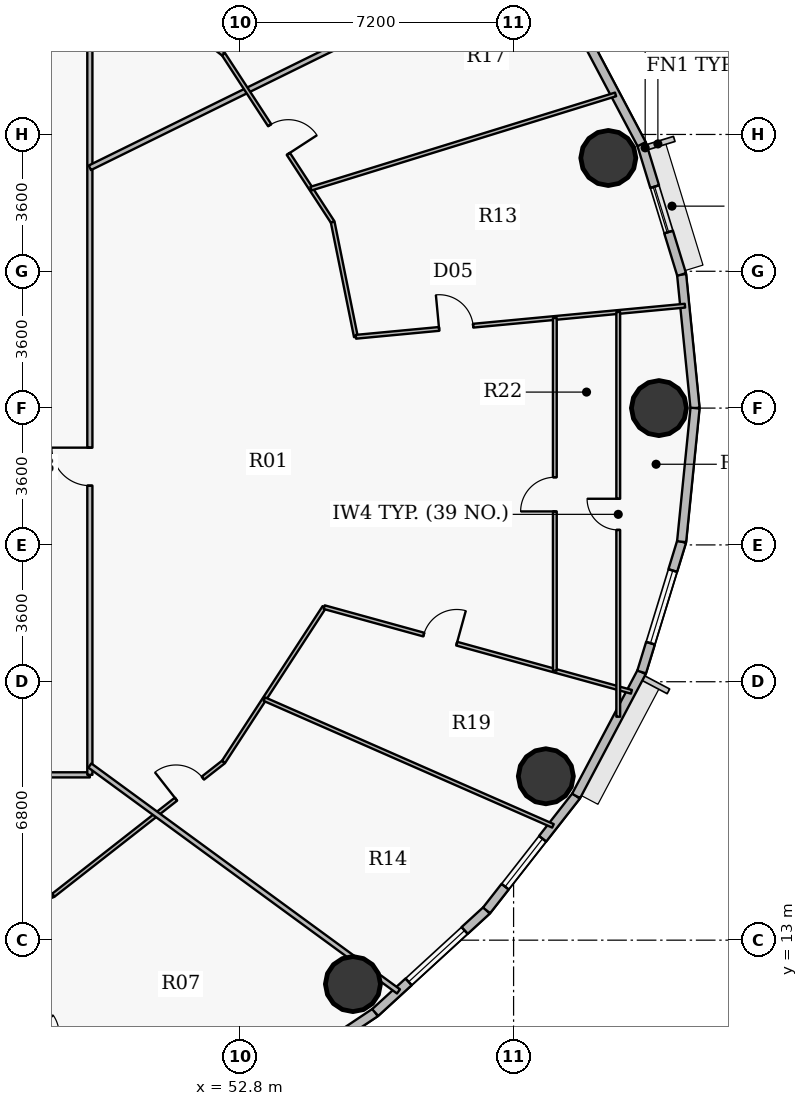
"""IFC4 building model, lengths in metres.
Left out: names, types, materials, properties, quantities, classifications, styles, units other than length and angle.
Written with IfcOpenShell. Run it as: python <this file> out.ifc"""

import sys

from ifc_helpers import new_model, si_unit, direction, frame, frame_2d, origin, origin_2d, place, context, subcontext, project, spatial, rectangle, hollow_circle, extrude, source, transform, mapped, element, fill, save


model = new_model("IFC4")
c1 = context("Model", 3, precision=1e-05, world=origin(), true_north=direction((0.0, 1.0)))
c2 = subcontext(c1, "Body", "Model", "MODEL_VIEW")
j1 = project(units=[si_unit("LENGTHUNIT", "METRE"), si_unit("PLANEANGLEUNIT", "RADIAN")], contexts=[c1])
p1 = place(None, origin())
s1 = spatial("IfcSite", under=j1, at=p1, CompositionType="ELEMENT")
p2 = place(p1, origin())
s2 = spatial("IfcBuilding", under=s1, at=p2, CompositionType="ELEMENT")
p3 = place(p2, frame((0.0, 0.0, 138.45)))
s3 = spatial("IfcBuildingStorey", under=s2, at=p3, CompositionType="ELEMENT", Elevation=138.45)
for number, where, z_axis, x_axis in (
    (1, (63.825, 27.0, 0.0), (0.0, 0.0, 1.0), (1.0, 0.0, 0.0)),
    (2, (62.493, 33.581, 0.0), (0.0, 0.0, 1.0), (1.0, 0.0, 0.0)),
    (3, (55.773, 11.844, 0.0), (0.0, 0.0, 1.0), (1.0, 0.0, 0.0)),
    (4, (60.849, 17.312, 0.0), (0.0, 0.0, 1.0), (1.0, 0.0, 0.0)),
):
    element("IfcColumn", number, at=place(p3, frame(where, z_axis=z_axis, x_axis=x_axis)), inside=s3, PredefinedType="COLUMN", context=c2, shape_type="SweptSolid", body=[
        extrude(hollow_circle(Radius=0.725, WallThickness=0.042, at=origin_2d()), origin(), (0.0, 0.0, 1.0), 3.75),
    ])
p4 = place(p3, frame((64.422, 30.515, 0.0), z_axis=(0.0, 0.0, 1.0), x_axis=(0.099989468229, -0.994988495533, 0.0)))
e5 = element("IfcWall", 5, at=p4, inside=s3, PredefinedType="SOLIDWALL", context=c2, shape_type="SweptSolid", body=[
    extrude(rectangle(XDim=3.533, YDim=0.24, at=frame_2d((1.767, 0.0))), origin(), (0.0, 0.0, 1.0), 3.5),
])
p5 = place(p3, frame((63.37, 33.945, 0.0), z_axis=(0.0, 0.0, 1.0), x_axis=(0.293124431344, -0.956074300329, 0.0)))
e6 = element("IfcWall", 6, at=p5, inside=s3, PredefinedType="SOLIDWALL", context=c2, shape_type="SweptSolid", body=[
    extrude(rectangle(XDim=3.587, YDim=0.24, at=frame_2d((1.793, 0.0))), origin(), (0.0, 0.0, 1.0), 3.5),
])
p6 = place(p5, frame((1.169, 0.0, 0.9)))
e7 = element("IfcOpeningElement", 7, at=p6, cuts=e6, PredefinedType="OPENING", context=c2, shape_type="SweptSolid", body=[
    extrude(rectangle(XDim=1.25, YDim=1.65, at=origin_2d()), frame((0.625, 0.13, 0.825), z_axis=(0.0, -1.0, 0.0), x_axis=(1.0, 0.0, 0.0)), (0.0, 0.0, 1.0), 0.26),
])
p7 = place(p3, frame((61.645, 37.206, 0.0), z_axis=(0.0, 0.0, 1.0), x_axis=(0.467614004126, -0.883932770716, 0.0)))
e8 = element("IfcWall", 8, at=p7, inside=s3, PredefinedType="SOLIDWALL", context=c2, shape_type="SweptSolid", body=[
    extrude(rectangle(XDim=3.689, YDim=0.24, at=frame_2d((1.844, 0.0))), origin(), (0.0, 0.0, 1.0), 3.5),
])
p8 = place(p3, frame((56.358, 11.097, 0.0), z_axis=(0.0, 0.0, 1.0), x_axis=(-0.831221811447, -0.555940914284, 0.0)))
e9 = element("IfcWall", 9, at=p8, inside=s3, PredefinedType="SOLIDWALL", context=c2, shape_type="SweptSolid", body=[
    extrude(rectangle(XDim=4.13, YDim=0.24, at=frame_2d((2.065, 0.0))), origin(), (0.0, 0.0, 1.0), 3.5),
])
p9 = place(p8, frame((1.065, 0.0, 0.9)))
e10 = element("IfcOpeningElement", 10, at=p9, cuts=e9, PredefinedType="OPENING", context=c2, shape_type="SweptSolid", body=[
    extrude(rectangle(XDim=2.0, YDim=1.75, at=origin_2d()), frame((1.0, 0.13, 0.875), z_axis=(0.0, -1.0, 0.0), x_axis=(1.0, 0.0, 0.0)), (0.0, 0.0, 1.0), 0.26),
])
p10 = place(p3, frame((59.289, 13.783, 0.0), z_axis=(0.0, 0.0, 1.0), x_axis=(-0.737113356241, -0.675769117414, 0.0)))
e11 = element("IfcWall", 11, at=p10, inside=s3, PredefinedType="SOLIDWALL", context=c2, shape_type="SweptSolid", body=[
    extrude(rectangle(XDim=3.976, YDim=0.24, at=frame_2d((1.988, 0.0))), origin(), (0.0, 0.0, 1.0), 3.5),
])
p11 = place(p10, frame((0.783, 0.0, 0.9)))
e12 = element("IfcOpeningElement", 12, at=p11, cuts=e11, PredefinedType="OPENING", context=c2, shape_type="SweptSolid", body=[
    extrude(rectangle(XDim=2.0, YDim=1.75, at=origin_2d()), frame((1.0, 0.13, 0.875), z_axis=(0.0, -1.0, 0.0), x_axis=(1.0, 0.0, 0.0)), (0.0, 0.0, 1.0), 0.26),
])
p12 = place(p3, frame((61.645, 16.794, 0.0), z_axis=(0.0, 0.0, 1.0), x_axis=(-0.616272103517, -0.787533297345, 0.0)))
e13 = element("IfcWall", 13, at=p12, inside=s3, PredefinedType="SOLIDWALL", context=c2, shape_type="SweptSolid", body=[
    extrude(rectangle(XDim=3.823, YDim=0.24, at=frame_2d((1.912, 0.0))), origin(), (0.0, 0.0, 1.0), 3.5),
])
p13 = place(p12, frame((1.43, 0.0, 0.9)))
e14 = element("IfcOpeningElement", 14, at=p13, cuts=e13, PredefinedType="OPENING", context=c2, shape_type="SweptSolid", body=[
    extrude(rectangle(XDim=1.6, YDim=1.75, at=origin_2d()), frame((0.8, 0.13, 0.875), z_axis=(0.0, -1.0, 0.0), x_axis=(1.0, 0.0, 0.0)), (0.0, 0.0, 1.0), 0.26),
])
p14 = place(p3, frame((63.37, 20.055, 0.0), z_axis=(0.0, 0.0, 1.0), x_axis=(-0.467614004126, -0.883932770716, 0.0)))
e15 = element("IfcWall", 15, at=p14, inside=s3, PredefinedType="SOLIDWALL", context=c2, shape_type="SweptSolid", body=[
    extrude(rectangle(XDim=3.689, YDim=0.24, at=frame_2d((1.844, 0.0))), origin(), (0.0, 0.0, 1.0), 3.5),
])
p15 = place(p3, frame((64.422, 23.485, 0.0), z_axis=(0.0, 0.0, 1.0), x_axis=(-0.293124431344, -0.956074300329, 0.0)))
e16 = element("IfcWall", 16, at=p15, inside=s3, PredefinedType="SOLIDWALL", context=c2, shape_type="SweptSolid", body=[
    extrude(rectangle(XDim=3.587, YDim=0.24, at=frame_2d((1.793, 0.0))), origin(), (0.0, 0.0, 1.0), 3.5),
])
p16 = place(p15, frame((0.794, 0.0, 0.9)))
e17 = element("IfcOpeningElement", 17, at=p16, cuts=e16, PredefinedType="OPENING", context=c2, shape_type="SweptSolid", body=[
    extrude(rectangle(XDim=2.0, YDim=1.75, at=origin_2d()), frame((1.0, 0.13, 0.875), z_axis=(0.0, -1.0, 0.0), x_axis=(1.0, 0.0, 0.0)), (0.0, 0.0, 1.0), 0.26),
])
p17 = place(p3, frame((64.775, 27.0, 0.0), z_axis=(0.0, 0.0, 1.0), x_axis=(-0.099989468229, -0.994988495533, 0.0)))
e18 = element("IfcWall", 18, at=p17, inside=s3, PredefinedType="SOLIDWALL", context=c2, shape_type="SweptSolid", body=[
    extrude(rectangle(XDim=3.533, YDim=0.24, at=frame_2d((1.767, 0.0))), origin(), (0.0, 0.0, 1.0), 3.5),
])
p18 = place(p3, frame((38.477, 17.35, 0.0), z_axis=(0.0, 0.0, 1.0), x_axis=(1.0, 0.0, 0.0)))
e19 = element("IfcWall", 19, at=p18, inside=s3, PredefinedType="PARTITIONING", context=c2, shape_type="SweptSolid", body=[
    extrude(rectangle(XDim=10.373, YDim=0.135, at=frame_2d((5.187, 0.0))), origin(), (0.0, 0.0, 1.0), 2.935),
])
p19 = place(p18, frame((4.687, 0.0, 0.0)))
e20 = element("IfcOpeningElement", 20, at=p19, cuts=e19, PredefinedType="OPENING", context=c2, shape_type="SweptSolid", body=[
    extrude(rectangle(XDim=1.0, YDim=2.15, at=origin_2d()), frame((0.5, 0.078, 1.075), z_axis=(0.0, -1.0, 0.0), x_axis=(1.0, 0.0, 0.0)), (0.0, 0.0, 1.0), 0.155),
])
p20 = place(p3, frame((45.35, 13.17, 0.0), z_axis=(0.0, 0.0, 1.0), x_axis=(0.928802486491, 0.370575149044, 0.0)))
e21 = element("IfcWall", 21, at=p20, inside=s3, PredefinedType="PARTITIONING", context=c2, shape_type="SweptSolid", body=[
    extrude(rectangle(XDim=2.736, YDim=0.1, at=frame_2d((1.368, 0.0))), origin(), (0.0, 0.0, 1.0), 3.5),
])
p21 = place(p3, frame((45.35, 13.17, 0.0), z_axis=(0.0, 0.0, 1.0), x_axis=(0.560082631059, -0.828436748573, 0.0)))
e22 = element("IfcWall", 22, at=p21, inside=s3, PredefinedType="PARTITIONING", context=c2, shape_type="SweptSolid", body=[
    extrude(rectangle(XDim=7.301, YDim=0.1, at=frame_2d((3.65, 0.0))), origin(), (0.0, 0.0, 1.0), 2.935),
])
p22 = place(p21, frame((3.2, 0.0, 0.0)))
e23 = element("IfcOpeningElement", 23, at=p22, cuts=e22, PredefinedType="OPENING", context=c2, shape_type="SweptSolid", body=[
    extrude(rectangle(XDim=0.9, YDim=2.1, at=origin_2d()), frame((0.45, 0.06, 1.05), z_axis=(0.0, -1.0, 0.0), x_axis=(1.0, 0.0, 0.0)), (0.0, 0.0, 1.0), 0.12),
])
p23 = place(p3, frame((47.891, 14.184, 0.0), z_axis=(0.0, 0.0, 1.0), x_axis=(0.787333679705, 0.616527109544, 0.0)))
e24 = element("IfcWall", 24, at=p23, inside=s3, PredefinedType="PARTITIONING", context=c2, shape_type="SweptSolid", body=[
    extrude(rectangle(XDim=5.685, YDim=0.1, at=frame_2d((2.842, 0.0))), origin(), (0.0, 0.0, 1.0), 2.935),
])
p24 = place(p23, frame((4.096, 0.0, 0.0)))
e25 = element("IfcOpeningElement", 25, at=p24, cuts=e24, PredefinedType="OPENING", context=c2, shape_type="SweptSolid", body=[
    extrude(rectangle(XDim=0.9, YDim=2.1, at=origin_2d()), frame((0.45, 0.06, 1.05), z_axis=(0.0, -1.0, 0.0), x_axis=(1.0, 0.0, 0.0)), (0.0, 0.0, 1.0), 0.12),
])
p25 = place(p3, frame((47.891, 39.816, 0.0), z_axis=(0.0, 0.0, 1.0), x_axis=(0.787347250317, -0.61650977885, 0.0)))
e26 = element("IfcWall", 26, at=p25, inside=s3, PredefinedType="PARTITIONING", context=c2, shape_type="SweptSolid", body=[
    extrude(rectangle(XDim=5.683, YDim=0.1, at=frame_2d((2.842, 0.0))), origin(), (0.0, 0.0, 1.0), 2.935),
])
p26 = place(p25, frame((3.923, 0.0, 0.0)))
e27 = element("IfcOpeningElement", 27, at=p26, cuts=e26, PredefinedType="OPENING", context=c2, shape_type="SweptSolid", body=[
    extrude(rectangle(XDim=0.9, YDim=2.1, at=origin_2d()), frame((0.45, 0.06, 1.05), z_axis=(0.0, -1.0, 0.0), x_axis=(1.0, 0.0, 0.0)), (0.0, 0.0, 1.0), 0.12),
])
p27 = place(p25, frame((1.286, 0.0, 0.0)))
e28 = element("IfcOpeningElement", 28, at=p27, cuts=e26, PredefinedType="OPENING", context=c2, shape_type="SweptSolid", body=[
    extrude(rectangle(XDim=0.9, YDim=2.1, at=origin_2d()), frame((0.45, 0.06, 1.05), z_axis=(0.0, -1.0, 0.0), x_axis=(1.0, 0.0, 0.0)), (0.0, 0.0, 1.0), 0.12),
])
p28 = place(p3, frame((48.85, 17.35, 0.0), z_axis=(0.0, 0.0, 1.0), x_axis=(0.0, 1.0, 0.0)))
e29 = element("IfcWall", 29, at=p28, inside=s3, PredefinedType="PARTITIONING", context=c2, shape_type="SweptSolid", body=[
    extrude(rectangle(XDim=19.3, YDim=0.135, at=frame_2d((9.65, 0.0))), origin(), (0.0, 0.0, 1.0), 2.935),
])
p29 = place(p28, frame((7.609, 0.0, 0.0)))
e30 = element("IfcOpeningElement", 30, at=p29, cuts=e29, PredefinedType="OPENING", context=c2, shape_type="SweptSolid", body=[
    extrude(rectangle(XDim=1.0, YDim=2.15, at=origin_2d()), frame((0.5, 0.078, 1.075), z_axis=(0.0, -1.0, 0.0), x_axis=(1.0, 0.0, 0.0)), (0.0, 0.0, 1.0), 0.155),
])
p30 = place(p3, frame((48.85, 17.595, 0.0), z_axis=(0.0, 0.0, 1.0), x_axis=(0.806958414, -0.590608261096, 0.0)))
e31 = element("IfcWall", 31, at=p30, inside=s3, PredefinedType="PARTITIONING", context=c2, shape_type="SweptSolid", body=[
    extrude(rectangle(XDim=10.063, YDim=0.135, at=frame_2d((5.032, 0.0))), origin(), (0.0, 0.0, 1.0), 2.935),
])
p31 = place(p3, frame((48.85, 33.323, 0.0), z_axis=(0.0, 0.0, 1.0), x_axis=(0.897255437174, 0.44151181237, 0.0)))
e32 = element("IfcWall", 32, at=p31, inside=s3, PredefinedType="PARTITIONING", context=c2, shape_type="SweptSolid", body=[
    extrude(rectangle(XDim=12.746, YDim=0.135, at=frame_2d((6.373, 0.0))), origin(), (0.0, 0.0, 1.0), 2.935),
])
p32 = place(p3, frame((52.366, 17.689, 0.0), z_axis=(0.0, 0.0, 1.0), x_axis=(0.545413870093, 0.838166874978, 0.0)))
e33 = element("IfcWall", 33, at=p32, inside=s3, PredefinedType="PARTITIONING", context=c2, shape_type="SweptSolid", body=[
    extrude(rectangle(XDim=4.859, YDim=0.1, at=frame_2d((2.43, 0.0))), origin(), (0.0, 0.0, 1.0), 2.935),
])
p33 = place(p3, frame((52.366, 36.311, 0.0), z_axis=(0.0, 0.0, 1.0), x_axis=(0.545405249109, -0.838172484781, 0.0)))
e34 = element("IfcWall", 34, at=p33, inside=s3, PredefinedType="PARTITIONING", context=c2, shape_type="SweptSolid", body=[
    extrude(rectangle(XDim=5.269, YDim=0.1, at=frame_2d((2.634, 0.0))), origin(), (0.0, 0.0, 1.0), 2.935),
])
p34 = place(p33, frame((2.228, 0.0, 0.0)))
e35 = element("IfcOpeningElement", 35, at=p34, cuts=e34, PredefinedType="OPENING", context=c2, shape_type="SweptSolid", body=[
    extrude(rectangle(XDim=0.9, YDim=2.1, at=origin_2d()), frame((0.45, 0.06, 1.05), z_axis=(0.0, -1.0, 0.0), x_axis=(1.0, 0.0, 0.0)), (0.0, 0.0, 1.0), 0.12),
])
p35 = place(p3, frame((53.442, 19.342, 0.0), z_axis=(0.0, 0.0, 1.0), x_axis=(0.91563160904, -0.402018353469, 0.0)))
e36 = element("IfcWall", 36, at=p35, inside=s3, PredefinedType="PARTITIONING", context=c2, shape_type="SweptSolid", body=[
    extrude(rectangle(XDim=8.294, YDim=0.1, at=frame_2d((4.147, 0.0))), origin(), (0.0, 0.0, 1.0), 2.935),
])
p36 = place(p3, frame((54.668, 32.774, 0.0), z_axis=(0.0, 0.0, 1.0), x_axis=(0.955345753083, 0.295490257144, 0.0)))
e37 = element("IfcWall", 37, at=p36, inside=s3, PredefinedType="PARTITIONING", context=c2, shape_type="SweptSolid", body=[
    extrude(rectangle(XDim=8.39, YDim=0.1, at=frame_2d((4.195, 0.0))), origin(), (0.0, 0.0, 1.0), 2.935),
])
p37 = place(p3, frame((55.017, 21.762, 0.0), z_axis=(0.0, 0.0, 1.0), x_axis=(0.964092156587, -0.265567907714, 0.0)))
e38 = element("IfcWall", 38, at=p37, inside=s3, PredefinedType="PARTITIONING", context=c2, shape_type="SweptSolid", body=[
    extrude(rectangle(XDim=8.385, YDim=0.1, at=frame_2d((4.192, 0.0))), origin(), (0.0, 0.0, 1.0), 2.935),
])
p38 = place(p37, frame((2.717, 0.0, 0.0)))
e39 = element("IfcOpeningElement", 39, at=p38, cuts=e38, PredefinedType="OPENING", context=c2, shape_type="SweptSolid", body=[
    extrude(rectangle(XDim=0.9, YDim=2.1, at=origin_2d()), frame((0.45, 0.06, 1.05), z_axis=(0.0, -1.0, 0.0), x_axis=(1.0, 0.0, 0.0)), (0.0, 0.0, 1.0), 0.12),
])
p39 = place(p3, frame((55.24, 31.895, 0.0), z_axis=(0.0, 0.0, 1.0), x_axis=(0.198189059207, -0.980163811213, 0.0)))
e40 = element("IfcWall", 40, at=p39, inside=s3, PredefinedType="PARTITIONING", context=c2, shape_type="SweptSolid", body=[
    extrude(rectangle(XDim=3.08, YDim=0.1, at=frame_2d((1.54, 0.0))), origin(), (0.0, 0.0, 1.0), 2.935),
])
p40 = place(p3, frame((55.85, 28.876, 0.0), z_axis=(0.0, 0.0, 1.0), x_axis=(0.995563342767, 0.094093732729, 0.0)))
e41 = element("IfcWall", 41, at=p40, inside=s3, PredefinedType="PARTITIONING", context=c2, shape_type="SweptSolid", body=[
    extrude(rectangle(XDim=8.697, YDim=0.1, at=frame_2d((4.349, 0.0))), origin(), (0.0, 0.0, 1.0), 2.935),
])
p41 = place(p40, frame((2.199, 0.0, 0.0)))
e42 = element("IfcOpeningElement", 42, at=p41, cuts=e41, PredefinedType="OPENING", context=c2, shape_type="SweptSolid", body=[
    extrude(rectangle(XDim=0.9, YDim=2.1, at=origin_2d()), frame((0.45, 0.06, 1.05), z_axis=(0.0, -1.0, 0.0), x_axis=(1.0, 0.0, 0.0)), (0.0, 0.0, 1.0), 0.12),
])
p42 = place(p3, frame((61.085, 20.09, 0.0), z_axis=(0.0, 0.0, 1.0), x_axis=(0.0, 1.0, 0.0)))
e43 = element("IfcWall", 43, at=p42, inside=s3, PredefinedType="PARTITIONING", context=c2, shape_type="SweptSolid", body=[
    extrude(rectangle(XDim=9.281, YDim=0.1, at=frame_2d((4.641, 0.0))), origin(), (0.0, 0.0, 1.0), 2.935),
])
p43 = place(p42, frame((4.19, 0.0, 0.0)))
e44 = element("IfcOpeningElement", 44, at=p43, cuts=e43, PredefinedType="OPENING", context=c2, shape_type="SweptSolid", body=[
    extrude(rectangle(XDim=0.9, YDim=2.1, at=origin_2d()), frame((0.45, 0.06, 1.05), z_axis=(0.0, -1.0, 0.0), x_axis=(1.0, 0.0, 0.0)), (0.0, 0.0, 1.0), 0.12),
])
p44 = place(p3, frame((62.754, 18.88, 0.0), z_axis=(0.0, 0.0, 1.0), x_axis=(0.0, 1.0, 0.0)))
e45 = element("IfcWall", 45, at=p44, inside=s3, PredefinedType="PARTITIONING", context=c2, shape_type="SweptSolid", body=[
    extrude(rectangle(XDim=10.649, YDim=0.1, at=frame_2d((5.325, 0.0))), origin(), (0.0, 0.0, 1.0), 2.935),
])
p45 = place(p44, frame((4.915, 0.0, 0.0)))
e46 = element("IfcOpeningElement", 46, at=p45, cuts=e45, PredefinedType="OPENING", context=c2, shape_type="SweptSolid", body=[
    extrude(rectangle(XDim=0.82, YDim=2.1, at=origin_2d()), frame((0.41, 0.06, 1.05), z_axis=(0.0, -1.0, 0.0), x_axis=(1.0, 0.0, 0.0)), (0.0, 0.0, 1.0), 0.12),
])
m1 = source(origin(), c2, "Body", "SweptSolid", [
    extrude(rectangle(XDim=2.0, YDim=1.75, at=origin_2d()), frame((1.0, 0.03, 0.875), z_axis=(0.0, -1.0, 0.0), x_axis=(1.0, 0.0, 0.0)), (0.0, 0.0, 1.0), 0.06),
])
p46 = place(p11, origin())
e47 = element("IfcWindow", 47, at=p46, inside=s3, PartitioningType="DOUBLE_PANEL_VERTICAL", PredefinedType="WINDOW", context=c2, shape_type="MappedRepresentation", body=[
    mapped(m1, transform((0.0, 0.0, 0.0), x_axis=(1.0, 0.0, 0.0), y_axis=(0.0, 1.0, 0.0), z_axis=(0.0, 0.0, 1.0), scale=1.0)),
])
fill(e12, e47)
m2 = source(origin(), c2, "Body", "SweptSolid", [
    extrude(rectangle(XDim=1.6, YDim=1.75, at=origin_2d()), frame((0.8, 0.03, 0.875), z_axis=(0.0, -1.0, 0.0), x_axis=(1.0, 0.0, 0.0)), (0.0, 0.0, 1.0), 0.06),
])
p47 = place(p13, origin())
e48 = element("IfcWindow", 48, at=p47, inside=s3, PartitioningType="DOUBLE_PANEL_VERTICAL", PredefinedType="WINDOW", context=c2, shape_type="MappedRepresentation", body=[
    mapped(m2, transform((0.0, 0.0, 0.0), x_axis=(1.0, 0.0, 0.0), y_axis=(0.0, 1.0, 0.0), z_axis=(0.0, 0.0, 1.0), scale=1.0)),
])
fill(e14, e48)
p48 = place(p16, origin())
e49 = element("IfcWindow", 49, at=p48, inside=s3, PartitioningType="DOUBLE_PANEL_VERTICAL", PredefinedType="WINDOW", context=c2, shape_type="MappedRepresentation", body=[
    mapped(m1, transform((0.0, 0.0, 0.0), x_axis=(1.0, 0.0, 0.0), y_axis=(0.0, 1.0, 0.0), z_axis=(0.0, 0.0, 1.0), scale=1.0)),
])
fill(e17, e49)
m3 = source(origin(), c2, "Body", "SweptSolid", [
    extrude(rectangle(XDim=1.25, YDim=1.65, at=origin_2d()), frame((0.625, 0.03, 0.825), z_axis=(0.0, -1.0, 0.0), x_axis=(1.0, 0.0, 0.0)), (0.0, 0.0, 1.0), 0.06),
])
p49 = place(p6, origin())
e50 = element("IfcWindow", 50, at=p49, inside=s3, PartitioningType="SINGLE_PANEL", PredefinedType="WINDOW", context=c2, shape_type="MappedRepresentation", body=[
    mapped(m3, transform((0.0, 0.0, 0.0), x_axis=(1.0, 0.0, 0.0), y_axis=(0.0, 1.0, 0.0), z_axis=(0.0, 0.0, 1.0), scale=1.0)),
])
fill(e7, e50)
m4 = source(origin(), c2, "Body", "SweptSolid", [
    extrude(rectangle(XDim=1.0, YDim=2.15, at=origin_2d()), frame((0.5, 0.025, 1.075), z_axis=(0.0, -1.0, 0.0), x_axis=(1.0, 0.0, 0.0)), (0.0, 0.0, 1.0), 0.05),
])
p50 = place(p29, origin())
e51 = element("IfcDoor", 51, at=p50, inside=s3, OperationType="SINGLE_SWING_RIGHT", PredefinedType="DOOR", context=c2, shape_type="MappedRepresentation", body=[
    mapped(m4, transform((0.0, 0.0, 0.0), x_axis=(1.0, 0.0, 0.0), y_axis=(0.0, 1.0, 0.0), z_axis=(0.0, 0.0, 1.0), scale=1.0)),
])
fill(e30, e51)
m5 = source(origin(), c2, "Body", "SweptSolid", [
    extrude(rectangle(XDim=0.9, YDim=2.1, at=origin_2d()), frame((0.45, 0.025, 1.05), z_axis=(0.0, -1.0, 0.0), x_axis=(1.0, 0.0, 0.0)), (0.0, 0.0, 1.0), 0.05),
])
p51 = place(p24, origin())
e52 = element("IfcDoor", 52, at=p51, inside=s3, OperationType="SINGLE_SWING_LEFT", PredefinedType="DOOR", context=c2, shape_type="MappedRepresentation", body=[
    mapped(m5, transform((0.0, 0.0, 0.0), x_axis=(1.0, 0.0, 0.0), y_axis=(0.0, 1.0, 0.0), z_axis=(0.0, 0.0, 1.0), scale=1.0)),
])
fill(e25, e52)
p52 = place(p38, origin())
e53 = element("IfcDoor", 53, at=p52, inside=s3, OperationType="SINGLE_SWING_RIGHT", PredefinedType="DOOR", context=c2, shape_type="MappedRepresentation", body=[
    mapped(m5, transform((0.0, 0.0, 0.0), x_axis=(1.0, 0.0, 0.0), y_axis=(0.0, 1.0, 0.0), z_axis=(0.0, 0.0, 1.0), scale=1.0)),
])
fill(e39, e53)
p53 = place(p41, origin())
e54 = element("IfcDoor", 54, at=p53, inside=s3, OperationType="SINGLE_SWING_LEFT", PredefinedType="DOOR", context=c2, shape_type="MappedRepresentation", body=[
    mapped(m5, transform((0.0, 0.0, 0.0), x_axis=(1.0, 0.0, 0.0), y_axis=(0.0, 1.0, 0.0), z_axis=(0.0, 0.0, 1.0), scale=1.0)),
])
fill(e42, e54)
p54 = place(p34, origin())
e55 = element("IfcDoor", 55, at=p54, inside=s3, OperationType="SINGLE_SWING_RIGHT", PredefinedType="DOOR", context=c2, shape_type="MappedRepresentation", body=[
    mapped(m5, transform((0.0, 0.0, 0.0), x_axis=(1.0, 0.0, 0.0), y_axis=(0.0, 1.0, 0.0), z_axis=(0.0, 0.0, 1.0), scale=1.0)),
])
fill(e35, e55)
p55 = place(p43, origin())
e56 = element("IfcDoor", 56, at=p55, inside=s3, OperationType="SINGLE_SWING_LEFT", PredefinedType="DOOR", context=c2, shape_type="MappedRepresentation", body=[
    mapped(m5, transform((0.0, 0.0, 0.0), x_axis=(1.0, 0.0, 0.0), y_axis=(0.0, 1.0, 0.0), z_axis=(0.0, 0.0, 1.0), scale=1.0)),
])
fill(e44, e56)
m6 = source(origin(), c2, "Body", "SweptSolid", [
    extrude(rectangle(XDim=0.82, YDim=2.1, at=origin_2d()), frame((0.41, 0.025, 1.05), z_axis=(0.0, -1.0, 0.0), x_axis=(1.0, 0.0, 0.0)), (0.0, 0.0, 1.0), 0.05),
])
p56 = place(p45, origin())
e57 = element("IfcDoor", 57, at=p56, inside=s3, OperationType="SINGLE_SWING_RIGHT", PredefinedType="DOOR", context=c2, shape_type="MappedRepresentation", body=[
    mapped(m6, transform((0.0, 0.0, 0.0), x_axis=(1.0, 0.0, 0.0), y_axis=(0.0, 1.0, 0.0), z_axis=(0.0, 0.0, 1.0), scale=1.0)),
])
fill(e46, e57)
save(model, sys.argv[1])
